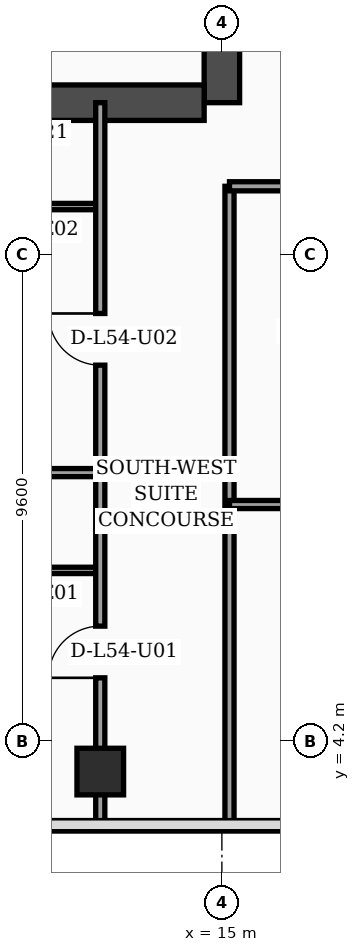
"""IFC4 building model, lengths in metres.
Left out: names, types, materials, properties, quantities, classifications, styles, units other than length and angle.
Written with IfcOpenShell. Run it as: python <this file> out.ifc"""

import sys

from ifc_helpers import new_model, si_unit, direction, frame, frame_2d, origin, origin_2d, place, context, subcontext, project, spatial, rectangle, extrude, element, fill, save


model = new_model("IFC4")
c1 = context("Model", 3, precision=1e-05, world=origin(), true_north=direction((0.0, 1.0)))
c2 = subcontext(c1, "Body", "Model", "MODEL_VIEW")
j1 = project(units=[si_unit("LENGTHUNIT", "METRE"), si_unit("PLANEANGLEUNIT", "RADIAN")], contexts=[c1])
p1 = place(None, origin())
s1 = spatial("IfcSite", under=j1, at=p1, CompositionType="ELEMENT")
p2 = place(p1, origin())
s2 = spatial("IfcBuilding", under=s1, at=p2, CompositionType="ELEMENT")
p3 = place(p2, frame((0.0, 0.0, 219.3)))
s3 = spatial("IfcBuildingStorey", under=s2, at=p3, CompositionType="ELEMENT", Elevation=219.3)
p4 = place(p3, frame((15.0, 16.8, 0.0), z_axis=(0.0, 0.0, 1.0), x_axis=(0.0, 1.0, 0.0)))
e1 = element("IfcWall", 1, at=p4, inside=s3, PredefinedType="SHEAR", context=c2, shape_type="SweptSolid", body=[
    extrude(rectangle(XDim=21.6, YDim=0.7, at=frame_2d((10.8, 0.0))), origin(), (0.0, 0.0, 1.0), 3.56),
])
p5 = place(p4, frame((8.65, 0.0, 0.0)))
e2 = element("IfcOpeningElement", 2, at=p5, cuts=e1, PredefinedType="OPENING", context=c2, shape_type="SweptSolid", body=[
    extrude(rectangle(XDim=1.1, YDim=2.2, at=frame_2d((0.55, 1.1))), frame((0.0, 0.36, 0.0), z_axis=(0.0, -1.0, 0.0), x_axis=(1.0, 0.0, 0.0)), (0.0, 0.0, 1.0), 0.72),
])
p6 = place(p4, frame((10.85, 0.0, 0.0)))
e3 = element("IfcOpeningElement", 3, at=p6, cuts=e1, PredefinedType="OPENING", context=c2, shape_type="SweptSolid", body=[
    extrude(rectangle(XDim=1.1, YDim=2.2, at=frame_2d((0.55, 1.1))), frame((0.0, 0.36, 0.0), z_axis=(0.0, -1.0, 0.0), x_axis=(1.0, 0.0, 0.0)), (0.0, 0.0, 1.0), 0.72),
])
p7 = place(p4, frame((13.5, 0.0, 0.0)))
e4 = element("IfcOpeningElement", 4, at=p7, cuts=e1, PredefinedType="OPENING", context=c2, shape_type="SweptSolid", body=[
    extrude(rectangle(XDim=1.1, YDim=2.2, at=frame_2d((0.55, 1.1))), frame((0.0, 0.36, 0.0), z_axis=(0.0, -1.0, 0.0), x_axis=(1.0, 0.0, 0.0)), (0.0, 0.0, 1.0), 0.72),
])
p8 = place(p4, frame((16.15, 0.0, 0.0)))
e5 = element("IfcOpeningElement", 5, at=p8, cuts=e1, PredefinedType="OPENING", context=c2, shape_type="SweptSolid", body=[
    extrude(rectangle(XDim=1.1, YDim=2.2, at=frame_2d((0.55, 1.1))), frame((0.0, 0.36, 0.0), z_axis=(0.0, -1.0, 0.0), x_axis=(1.0, 0.0, 0.0)), (0.0, 0.0, 1.0), 0.72),
])
p9 = place(p3, frame((4.55, 16.8, 0.0), z_axis=(0.0, 0.0, 1.0), x_axis=(1.0, 0.0, 0.0)))
e6 = element("IfcWall", 6, at=p9, inside=s3, PredefinedType="SHEAR", context=c2, shape_type="SweptSolid", body=[
    extrude(rectangle(XDim=10.1, YDim=0.7, at=frame_2d((5.05, 0.0))), origin(), (0.0, 0.0, 1.0), 3.56),
])
p10 = place(p3, frame((12.6, 3.6, 0.0), z_axis=(0.0, 0.0, 1.0), x_axis=(1.0, 0.0, 0.0)))
e7 = element("IfcColumn", 7, at=p10, inside=s3, PredefinedType="COLUMN", context=c2, shape_type="SweptSolid", body=[
    extrude(rectangle(XDim=0.92, YDim=0.92, at=origin_2d()), origin(), (0.0, 0.0, 1.0), 3.56),
])
p11 = place(p3, frame((3.2, 7.57, 0.0), z_axis=(0.0, 0.0, 1.0), x_axis=(1.0, 0.0, 0.0)))
e8 = element("IfcWall", 8, at=p11, inside=s3, PredefinedType="PARTITIONING", context=c2, shape_type="SweptSolid", body=[
    extrude(rectangle(XDim=9.4, YDim=0.125, at=frame_2d((4.7, 0.0))), origin(), (0.0, 0.0, 1.0), 2.94),
])
p12 = place(p11, frame((3.3, 0.0, 0.0)))
e9 = element("IfcOpeningElement", 9, at=p12, cuts=e8, PredefinedType="OPENING", context=c2, shape_type="SweptSolid", body=[
    extrude(rectangle(XDim=0.96, YDim=2.2, at=frame_2d((0.48, 1.1))), frame((0.0, 0.073, 0.0), z_axis=(0.0, -1.0, 0.0), x_axis=(1.0, 0.0, 0.0)), (0.0, 0.0, 1.0), 0.145),
])
p13 = place(p11, frame((7.49, 0.0, 0.0)))
e10 = element("IfcOpeningElement", 10, at=p13, cuts=e8, PredefinedType="OPENING", context=c2, shape_type="SweptSolid", body=[
    extrude(rectangle(XDim=0.9, YDim=2.15, at=frame_2d((0.45, 1.075))), frame((0.0, 0.073, 0.0), z_axis=(0.0, -1.0, 0.0), x_axis=(1.0, 0.0, 0.0)), (0.0, 0.0, 1.0), 0.145),
])
p14 = place(p3, frame((0.08, 14.75, 0.0), z_axis=(0.0, 0.0, 1.0), x_axis=(1.0, 0.0, 0.0)))
e11 = element("IfcWall", 11, at=p14, inside=s3, PredefinedType="PARTITIONING", context=c2, shape_type="SweptSolid", body=[
    extrude(rectangle(XDim=12.52, YDim=0.125, at=frame_2d((6.26, 0.0))), origin(), (0.0, 0.0, 1.0), 2.94),
])
p15 = place(p14, frame((4.32, 0.0, 0.0)))
e12 = element("IfcOpeningElement", 12, at=p15, cuts=e11, PredefinedType="OPENING", context=c2, shape_type="SweptSolid", body=[
    extrude(rectangle(XDim=0.96, YDim=2.2, at=frame_2d((0.48, 1.1))), frame((0.0, 0.073, 0.0), z_axis=(0.0, -1.0, 0.0), x_axis=(1.0, 0.0, 0.0)), (0.0, 0.0, 1.0), 0.145),
])
p16 = place(p14, frame((10.61, 0.0, 0.0)))
e13 = element("IfcOpeningElement", 13, at=p16, cuts=e11, PredefinedType="OPENING", context=c2, shape_type="SweptSolid", body=[
    extrude(rectangle(XDim=0.9, YDim=2.15, at=frame_2d((0.45, 1.075))), frame((0.0, 0.073, 0.0), z_axis=(0.0, -1.0, 0.0), x_axis=(1.0, 0.0, 0.0)), (0.0, 0.0, 1.0), 0.145),
])
p17 = place(p3, frame((0.08, 9.5, 0.0), z_axis=(0.0, 0.0, 1.0), x_axis=(1.0, 0.0, 0.0)))
e14 = element("IfcWall", 14, at=p17, inside=s3, PredefinedType="PARTITIONING", context=c2, shape_type="SweptSolid", body=[
    extrude(rectangle(XDim=12.52, YDim=0.16, at=frame_2d((6.26, 0.0))), origin(), (0.0, 0.0, 1.0), 2.94),
])
p18 = place(p3, frame((12.6, 2.44, 0.0), z_axis=(0.0, 0.0, 1.0), x_axis=(0.0, 1.0, 0.0)))
e15 = element("IfcWall", 15, at=p18, inside=s3, PredefinedType="PARTITIONING", context=c2, shape_type="SweptSolid", body=[
    extrude(rectangle(XDim=14.36, YDim=0.18, at=frame_2d((7.18, 0.0))), origin(), (0.0, 0.0, 1.0), 2.94),
])
p19 = place(p18, frame((3.01, 0.0, 0.0)))
e16 = element("IfcOpeningElement", 16, at=p19, cuts=e15, PredefinedType="OPENING", context=c2, shape_type="SweptSolid", body=[
    extrude(rectangle(XDim=1.02, YDim=2.2, at=frame_2d((0.51, 1.1))), frame((0.0, 0.1, 0.0), z_axis=(0.0, -1.0, 0.0), x_axis=(1.0, 0.0, 0.0)), (0.0, 0.0, 1.0), 0.2),
])
p20 = place(p18, frame((9.18, 0.0, 0.0)))
e17 = element("IfcOpeningElement", 17, at=p20, cuts=e15, PredefinedType="OPENING", context=c2, shape_type="SweptSolid", body=[
    extrude(rectangle(XDim=1.02, YDim=2.2, at=frame_2d((0.51, 1.1))), frame((0.0, 0.1, 0.0), z_axis=(0.0, -1.0, 0.0), x_axis=(1.0, 0.0, 0.0)), (0.0, 0.0, 1.0), 0.2),
])
p21 = place(p3, frame((15.15, 2.44, 0.0), z_axis=(0.0, 0.0, 1.0), x_axis=(0.0, 1.0, 0.0)))
e18 = element("IfcWall", 18, at=p21, inside=s3, PredefinedType="PARTITIONING", context=c2, shape_type="SweptSolid", body=[
    extrude(rectangle(XDim=12.71, YDim=0.18, at=frame_2d((6.355, 0.0))), origin(), (0.0, 0.0, 1.0), 3.09),
])
p22 = place(p3, frame((15.15, 8.87, 0.0), z_axis=(0.0, 0.0, 1.0), x_axis=(1.0, 0.0, 0.0)))
e19 = element("IfcWall", 19, at=p22, inside=s3, PredefinedType="PARTITIONING", context=c2, shape_type="SweptSolid", body=[
    extrude(rectangle(XDim=4.45, YDim=0.16, at=frame_2d((2.225, 0.0))), origin(), (0.0, 0.0, 1.0), 3.56),
])
p23 = place(p22, frame((1.75, 0.0, 0.0)))
e20 = element("IfcOpeningElement", 20, at=p23, cuts=e19, PredefinedType="OPENING", context=c2, shape_type="SweptSolid", body=[
    extrude(rectangle(XDim=0.96, YDim=2.2, at=frame_2d((0.48, 1.1))), frame((0.0, 0.09, 0.0), z_axis=(0.0, -1.0, 0.0), x_axis=(1.0, 0.0, 0.0)), (0.0, 0.0, 1.0), 0.18),
])
p24 = place(p3, frame((15.15, 15.15, 0.0), z_axis=(0.0, 0.0, 1.0), x_axis=(1.0, 0.0, 0.0)))
e21 = element("IfcWall", 21, at=p24, inside=s3, PredefinedType="PARTITIONING", context=c2, shape_type="SweptSolid", body=[
    extrude(rectangle(XDim=6.45, YDim=0.18, at=frame_2d((3.225, 0.0))), origin(), (0.0, 0.0, 1.0), 2.59),
])
p25 = place(p24, frame((1.74, 0.0, 0.0)))
e22 = element("IfcOpeningElement", 22, at=p25, cuts=e21, PredefinedType="OPENING", context=c2, shape_type="SweptSolid", body=[
    extrude(rectangle(XDim=1.02, YDim=2.2, at=frame_2d((0.51, 1.1))), frame((0.0, 0.1, 0.0), z_axis=(0.0, -1.0, 0.0), x_axis=(1.0, 0.0, 0.0)), (0.0, 0.0, 1.0), 0.2),
])
p26 = place(p19, origin())
e23 = element("IfcDoor", 23, at=p26, inside=s3, OperationType="SINGLE_SWING_LEFT", PredefinedType="DOOR", context=c2, shape_type="SweptSolid", body=[
    extrude(rectangle(XDim=1.02, YDim=2.2, at=frame_2d((0.51, 1.1))), frame((0.0, 0.025, 0.0), z_axis=(0.0, -1.0, 0.0), x_axis=(1.0, 0.0, 0.0)), (0.0, 0.0, 1.0), 0.05),
])
fill(e16, e23)
p27 = place(p20, origin())
e24 = element("IfcDoor", 24, at=p27, inside=s3, OperationType="SINGLE_SWING_RIGHT", PredefinedType="DOOR", context=c2, shape_type="SweptSolid", body=[
    extrude(rectangle(XDim=1.02, YDim=2.2, at=frame_2d((0.51, 1.1))), frame((0.0, 0.025, 0.0), z_axis=(0.0, -1.0, 0.0), x_axis=(1.0, 0.0, 0.0)), (0.0, 0.0, 1.0), 0.05),
])
fill(e17, e24)
save(model, sys.argv[1])
